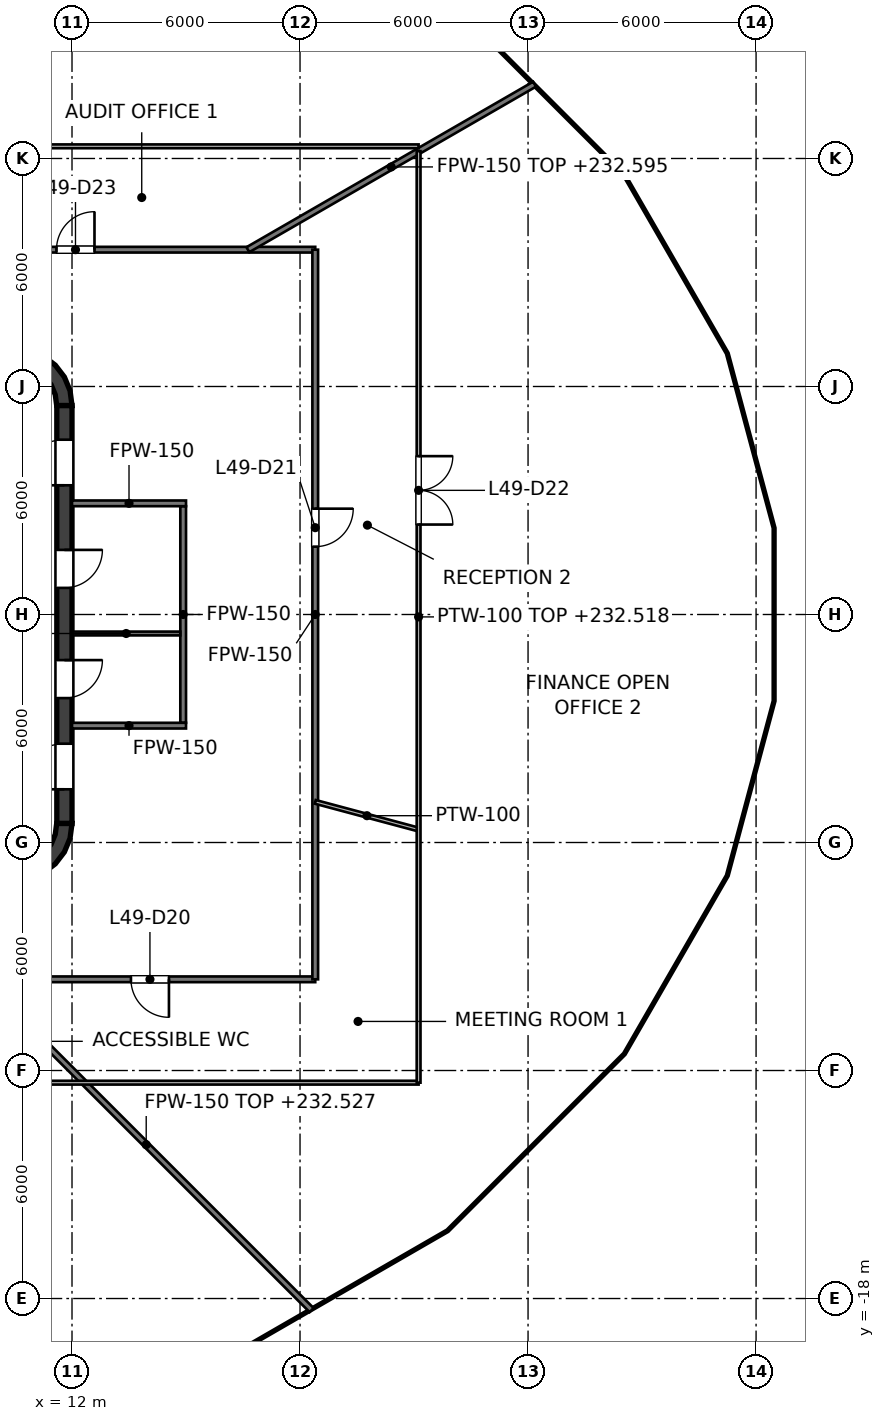
"""IFC4 building model, lengths in metres.
Left out: names, types, materials, properties, quantities, classifications, styles, units other than length and angle.
Written with IfcOpenShell. Run it as: python <this file> out.ifc"""

import sys

from ifc_helpers import new_model, si_unit, direction, frame, frame_2d, origin, place, context, subcontext, project, spatial, polyline, rectangle, outline, extrude, element, fill, save


model = new_model("IFC4")
c1 = context("Model", 3, precision=1e-05, world=origin(), true_north=direction((0.0, 1.0)))
c2 = subcontext(c1, "Body", "Model", "MODEL_VIEW")
j1 = project(units=[si_unit("LENGTHUNIT", "METRE"), si_unit("PLANEANGLEUNIT", "RADIAN")], contexts=[c1])
p1 = place(None, origin())
s1 = spatial("IfcSite", under=j1, at=p1, CompositionType="ELEMENT")
p2 = place(p1, origin())
s2 = spatial("IfcBuilding", under=s1, at=p2, CompositionType="ELEMENT")
p3 = place(p2, frame((0.0, 0.0, 229.6)))
s3 = spatial("IfcBuildingStorey", under=s2, at=p3, CompositionType="ELEMENT", Elevation=229.6)
p4 = place(p3, frame((11.8, -5.5, 0.0), z_axis=(0.0, 0.0, 1.0), x_axis=(0.0, 1.0, 0.0)))
e1 = element("IfcWall", 1, at=p4, inside=s3, PredefinedType="SHEAR", context=c2, shape_type="SweptSolid", body=[
    extrude(rectangle(XDim=11.0, YDim=0.4, at=frame_2d((5.5, 0.0))), origin(), (0.0, 0.0, 1.0), 4.0),
])
p5 = place(p4, frame((3.3, 0.0, 0.0)))
e2 = element("IfcOpeningElement", 2, at=p5, cuts=e1, PredefinedType="OPENING", context=c2, shape_type="SweptSolid", body=[
    extrude(rectangle(XDim=1.0, YDim=2.1, at=frame_2d((0.5, 1.05))), frame((0.0, 0.2, 0.0), z_axis=(0.0, -1.0, 0.0), x_axis=(1.0, 0.0, 0.0)), (0.0, 0.0, 1.0), 0.4),
])
p6 = place(p4, frame((6.2, 0.0, 0.0)))
e3 = element("IfcOpeningElement", 3, at=p6, cuts=e1, PredefinedType="OPENING", context=c2, shape_type="SweptSolid", body=[
    extrude(rectangle(XDim=1.0, YDim=2.1, at=frame_2d((0.5, 1.05))), frame((0.0, 0.2, 0.0), z_axis=(0.0, -1.0, 0.0), x_axis=(1.0, 0.0, 0.0)), (0.0, 0.0, 1.0), 0.4),
])
p7 = place(p4, frame((0.9, 0.0, 0.0)))
e4 = element("IfcOpeningElement", 4, at=p7, cuts=e1, PredefinedType="OPENING", context=c2, shape_type="SweptSolid", body=[
    extrude(rectangle(XDim=1.2, YDim=2.1, at=frame_2d((0.6, 1.05))), frame((0.0, 0.2, 0.0), z_axis=(0.0, -1.0, 0.0), x_axis=(1.0, 0.0, 0.0)), (0.0, 0.0, 1.0), 0.4),
])
p8 = place(p4, frame((8.9, 0.0, 0.0)))
e5 = element("IfcOpeningElement", 5, at=p8, cuts=e1, PredefinedType="OPENING", context=c2, shape_type="SweptSolid", body=[
    extrude(rectangle(XDim=1.2, YDim=2.1, at=frame_2d((0.6, 1.05))), frame((0.0, 0.2, 0.0), z_axis=(0.0, -1.0, 0.0), x_axis=(1.0, 0.0, 0.0)), (0.0, 0.0, 1.0), 0.4),
])
p9 = place(p3, origin())
e6 = element("IfcWall", 6, at=p9, inside=s3, PredefinedType="SHEAR", context=c2, shape_type="SweptSolid", body=[
    extrude(outline(polyline([(10.5, 7.0), (10.5, 6.596), (10.784, 6.559), (11.048, 6.45), (11.275, 6.275), (11.45, 6.048), (11.559, 5.784), (11.596, 5.5), (12.0, 5.5), (11.949, 5.888), (11.799, 6.25), (11.561, 6.561), (11.25, 6.799), (10.888, 6.949), (10.5, 7.0)])), origin(), (0.0, 0.0, 1.0), 4.0),
])
e7 = element("IfcWall", 7, at=p9, inside=s3, PredefinedType="SHEAR", context=c2, shape_type="SweptSolid", body=[
    extrude(outline(polyline([(12.0, -5.5), (11.596, -5.5), (11.559, -5.784), (11.45, -6.048), (11.275, -6.275), (11.048, -6.45), (10.784, -6.559), (10.5, -6.596), (10.5, -7.0), (10.888, -6.949), (11.25, -6.799), (11.561, -6.561), (11.799, -6.25), (11.949, -5.888), (12.0, -5.5)])), origin(), (0.0, 0.0, 1.0), 4.0),
])
p10 = place(p3, frame((14.925, -2.85, 0.0), z_axis=(0.0, 0.0, 1.0), x_axis=(0.0, 1.0, 0.0)))
e8 = element("IfcWall", 8, at=p10, inside=s3, PredefinedType="PARTITIONING", context=c2, shape_type="SweptSolid", body=[
    extrude(rectangle(XDim=5.7, YDim=0.15, at=frame_2d((2.85, 0.0))), origin(), (0.0, 0.0, 1.0), 2.918),
])
for number, where, z_axis, x_axis in (
    (9, (12.0, 2.925, 0.0), (0.0, 0.0, 1.0), (1.0, 0.0, 0.0)),
    (10, (12.0, -2.925, 0.0), (0.0, 0.0, 1.0), (1.0, 0.0, 0.0)),
):
    element("IfcWall", number, at=place(p3, frame(where, z_axis=z_axis, x_axis=x_axis)), inside=s3, PredefinedType="PARTITIONING", context=c2, shape_type="SweptSolid", body=[
        extrude(rectangle(XDim=3.0, YDim=0.15, at=frame_2d((1.5, 0.0))), origin(), (0.0, 0.0, 1.0), 2.918),
    ])
p11 = place(p3, frame((12.0, -0.5, 0.0), z_axis=(0.0, 0.0, 1.0), x_axis=(1.0, 0.0, 0.0)))
e11 = element("IfcWall", 11, at=p11, inside=s3, PredefinedType="PARTITIONING", context=c2, shape_type="SweptSolid", body=[
    extrude(rectangle(XDim=2.85, YDim=0.1, at=frame_2d((1.425, 0.0))), origin(), (0.0, 0.0, 1.0), 3.85),
])
p12 = place(p3, frame((9.6, -9.6, 0.0), z_axis=(0.0, 0.0, 1.0), x_axis=(0.707106781187, -0.707106781187, 0.0)))
e12 = element("IfcWall", 12, at=p12, inside=s3, PredefinedType="PARTITIONING", context=c2, shape_type="SweptSolid", body=[
    extrude(rectangle(XDim=12.311, YDim=0.15, at=frame_2d((6.155, 0.0))), origin(), (0.0, 0.0, 1.0), 2.927),
])
p13 = place(p3, frame((-18.4, -9.6, 0.0), z_axis=(0.0, 0.0, 1.0), x_axis=(1.0, 0.0, 0.0)))
e13 = element("IfcWall", 13, at=p13, inside=s3, PredefinedType="PARTITIONING", context=c2, shape_type="SweptSolid", body=[
    extrude(rectangle(XDim=36.8, YDim=0.15, at=frame_2d((18.4, 0.0))), origin(), (0.0, 0.0, 1.0), 2.927),
])
p14 = place(p13, frame((13.866, 0.0, 0.0)))
e14 = element("IfcOpeningElement", 14, at=p14, cuts=e13, PredefinedType="OPENING", context=c2, shape_type="SweptSolid", body=[
    extrude(rectangle(XDim=1.0, YDim=2.1, at=frame_2d((0.5, 1.05))), frame((0.0, 0.075, 0.0), z_axis=(0.0, -1.0, 0.0), x_axis=(1.0, 0.0, 0.0)), (0.0, 0.0, 1.0), 0.15),
])
p15 = place(p13, frame((18.999, 0.0, 0.0)))
e15 = element("IfcOpeningElement", 15, at=p15, cuts=e13, PredefinedType="OPENING", context=c2, shape_type="SweptSolid", body=[
    extrude(rectangle(XDim=1.0, YDim=2.1, at=frame_2d((0.5, 1.05))), frame((0.0, 0.075, 0.0), z_axis=(0.0, -1.0, 0.0), x_axis=(1.0, 0.0, 0.0)), (0.0, 0.0, 1.0), 0.15),
])
p16 = place(p13, frame((25.061, 0.0, 0.0)))
e16 = element("IfcOpeningElement", 16, at=p16, cuts=e13, PredefinedType="OPENING", context=c2, shape_type="SweptSolid", body=[
    extrude(rectangle(XDim=1.0, YDim=2.1, at=frame_2d((0.5, 1.05))), frame((0.0, 0.075, 0.0), z_axis=(0.0, -1.0, 0.0), x_axis=(1.0, 0.0, 0.0)), (0.0, 0.0, 1.0), 0.15),
])
p17 = place(p13, frame((31.951, 0.0, 0.0)))
e17 = element("IfcOpeningElement", 17, at=p17, cuts=e13, PredefinedType="OPENING", context=c2, shape_type="SweptSolid", body=[
    extrude(rectangle(XDim=1.0, YDim=2.1, at=frame_2d((0.5, 1.05))), frame((0.0, 0.075, 0.0), z_axis=(0.0, -1.0, 0.0), x_axis=(1.0, 0.0, 0.0)), (0.0, 0.0, 1.0), 0.15),
])
p18 = place(p13, frame((1.71, 0.0, 0.0)))
e18 = element("IfcOpeningElement", 18, at=p18, cuts=e13, PredefinedType="OPENING", context=c2, shape_type="SweptSolid", body=[
    extrude(rectangle(XDim=1.0, YDim=2.1, at=frame_2d((0.5, 1.05))), frame((0.0, 0.075, 0.0), z_axis=(0.0, -1.0, 0.0), x_axis=(1.0, 0.0, 0.0)), (0.0, 0.0, 1.0), 0.15),
])
p19 = place(p13, frame((8.038, 0.0, 0.0)))
e19 = element("IfcOpeningElement", 19, at=p19, cuts=e13, PredefinedType="OPENING", context=c2, shape_type="SweptSolid", body=[
    extrude(rectangle(XDim=1.0, YDim=2.1, at=frame_2d((0.5, 1.05))), frame((0.0, 0.075, 0.0), z_axis=(0.0, -1.0, 0.0), x_axis=(1.0, 0.0, 0.0)), (0.0, 0.0, 1.0), 0.15),
])
p20 = place(p3, frame((-18.4, 9.6, 0.0), z_axis=(0.0, 0.0, 1.0), x_axis=(1.0, 0.0, 0.0)))
e20 = element("IfcWall", 20, at=p20, inside=s3, PredefinedType="PARTITIONING", context=c2, shape_type="SweptSolid", body=[
    extrude(rectangle(XDim=36.8, YDim=0.15, at=frame_2d((18.4, 0.0))), origin(), (0.0, 0.0, 1.0), 2.927),
])
p21 = place(p20, frame((29.991, 0.0, 0.0)))
e21 = element("IfcOpeningElement", 21, at=p21, cuts=e20, PredefinedType="OPENING", context=c2, shape_type="SweptSolid", body=[
    extrude(rectangle(XDim=1.0, YDim=2.1, at=frame_2d((0.5, 1.05))), frame((0.0, 0.075, 0.0), z_axis=(0.0, -1.0, 0.0), x_axis=(1.0, 0.0, 0.0)), (0.0, 0.0, 1.0), 0.15),
])
p22 = place(p20, frame((23.208, 0.0, 0.0)))
e22 = element("IfcOpeningElement", 22, at=p22, cuts=e20, PredefinedType="OPENING", context=c2, shape_type="SweptSolid", body=[
    extrude(rectangle(XDim=1.0, YDim=2.1, at=frame_2d((0.5, 1.05))), frame((0.0, 0.075, 0.0), z_axis=(0.0, -1.0, 0.0), x_axis=(1.0, 0.0, 0.0)), (0.0, 0.0, 1.0), 0.15),
])
p23 = place(p20, frame((18.044, 0.0, 0.0)))
e23 = element("IfcOpeningElement", 23, at=p23, cuts=e20, PredefinedType="OPENING", context=c2, shape_type="SweptSolid", body=[
    extrude(rectangle(XDim=1.0, YDim=2.1, at=frame_2d((0.5, 1.05))), frame((0.0, 0.075, 0.0), z_axis=(0.0, -1.0, 0.0), x_axis=(1.0, 0.0, 0.0)), (0.0, 0.0, 1.0), 0.15),
])
p24 = place(p20, frame((11.814, 0.0, 0.0)))
e24 = element("IfcOpeningElement", 24, at=p24, cuts=e20, PredefinedType="OPENING", context=c2, shape_type="SweptSolid", body=[
    extrude(rectangle(XDim=1.0, YDim=2.1, at=frame_2d((0.5, 1.05))), frame((0.0, 0.075, 0.0), z_axis=(0.0, -1.0, 0.0), x_axis=(1.0, 0.0, 0.0)), (0.0, 0.0, 1.0), 0.15),
])
p25 = place(p3, frame((16.628, 9.6, 0.0), z_axis=(0.0, 0.0, 1.0), x_axis=(0.866023145199, 0.500003911965, 0.0)))
e25 = element("IfcWall", 25, at=p25, inside=s3, PredefinedType="PARTITIONING", context=c2, shape_type="SweptSolid", body=[
    extrude(rectangle(XDim=8.71, YDim=0.15, at=frame_2d((4.355, 0.0))), origin(), (0.0, 0.0, 1.0), 2.995),
])
p26 = place(p3, frame((18.4, -9.6, 0.0), z_axis=(0.0, 0.0, 1.0), x_axis=(0.0, 1.0, 0.0)))
e26 = element("IfcWall", 26, at=p26, inside=s3, PredefinedType="PARTITIONING", context=c2, shape_type="SweptSolid", body=[
    extrude(rectangle(XDim=19.2, YDim=0.15, at=frame_2d((9.6, 0.0))), origin(), (0.0, 0.0, 1.0), 2.918),
])
p27 = place(p26, frame((11.385, 0.0, 0.0)))
e27 = element("IfcOpeningElement", 27, at=p27, cuts=e26, PredefinedType="OPENING", context=c2, shape_type="SweptSolid", body=[
    extrude(rectangle(XDim=1.0, YDim=2.1, at=frame_2d((0.5, 1.05))), frame((0.0, 0.075, 0.0), z_axis=(0.0, -1.0, 0.0), x_axis=(1.0, 0.0, 0.0)), (0.0, 0.0, 1.0), 0.15),
])
p28 = place(p3, frame((18.4, -4.93, 0.0), z_axis=(0.0, 0.0, 1.0), x_axis=(0.965914770141, -0.258860303684, 0.0)))
e28 = element("IfcWall", 28, at=p28, inside=s3, PredefinedType="PARTITIONING", context=c2, shape_type="SweptSolid", body=[
    extrude(rectangle(XDim=2.816, YDim=0.1, at=frame_2d((1.408, 0.0))), origin(), (0.0, 0.0, 1.0), 3.85),
])
p29 = place(p3, frame((-16.615, -12.32, 0.0), z_axis=(0.0, 0.0, 1.0), x_axis=(1.0, 0.0, 0.0)))
e29 = element("IfcWall", 29, at=p29, inside=s3, PredefinedType="PARTITIONING", context=c2, shape_type="SweptSolid", body=[
    extrude(rectangle(XDim=37.735, YDim=0.1, at=frame_2d((18.868, 0.0))), origin(), (0.0, 0.0, 1.0), 2.927),
])
p30 = place(p29, frame((17.19, 0.0, 0.0)))
e30 = element("IfcOpeningElement", 30, at=p30, cuts=e29, PredefinedType="OPENING", context=c2, shape_type="SweptSolid", body=[
    extrude(rectangle(XDim=1.8, YDim=2.1, at=frame_2d((0.9, 1.05))), frame((0.0, 0.05, 0.0), z_axis=(0.0, -1.0, 0.0), x_axis=(1.0, 0.0, 0.0)), (0.0, 0.0, 1.0), 0.1),
])
p31 = place(p29, frame((4.301, 0.0, 0.0)))
e31 = element("IfcOpeningElement", 31, at=p31, cuts=e29, PredefinedType="OPENING", context=c2, shape_type="SweptSolid", body=[
    extrude(rectangle(XDim=0.9, YDim=2.1, at=frame_2d((0.45, 1.05))), frame((0.0, 0.05, 0.0), z_axis=(0.0, -1.0, 0.0), x_axis=(1.0, 0.0, 0.0)), (0.0, 0.0, 1.0), 0.1),
])
p32 = place(p3, frame((-21.12, 12.32, 0.0), z_axis=(0.0, 0.0, 1.0), x_axis=(1.0, 0.0, 0.0)))
e32 = element("IfcWall", 32, at=p32, inside=s3, PredefinedType="PARTITIONING", context=c2, shape_type="SweptSolid", body=[
    extrude(rectangle(XDim=42.24, YDim=0.1, at=frame_2d((21.12, 0.0))), origin(), (0.0, 0.0, 1.0), 2.927),
])
p33 = place(p32, frame((20.419, 0.0, 0.0)))
e33 = element("IfcOpeningElement", 33, at=p33, cuts=e32, PredefinedType="OPENING", context=c2, shape_type="SweptSolid", body=[
    extrude(rectangle(XDim=1.8, YDim=2.1, at=frame_2d((0.9, 1.05))), frame((0.0, 0.05, 0.0), z_axis=(0.0, -1.0, 0.0), x_axis=(1.0, 0.0, 0.0)), (0.0, 0.0, 1.0), 0.1),
])
p34 = place(p3, frame((21.12, -12.32, 0.0), z_axis=(0.0, 0.0, 1.0), x_axis=(0.0, 1.0, 0.0)))
e34 = element("IfcWall", 34, at=p34, inside=s3, PredefinedType="PARTITIONING", context=c2, shape_type="SweptSolid", body=[
    extrude(rectangle(XDim=24.513, YDim=0.1, at=frame_2d((12.257, 0.0))), origin(), (0.0, 0.0, 1.0), 2.918),
])
p35 = place(p34, frame((14.687, 0.0, 0.0)))
e35 = element("IfcOpeningElement", 35, at=p35, cuts=e34, PredefinedType="OPENING", context=c2, shape_type="SweptSolid", body=[
    extrude(rectangle(XDim=1.8, YDim=2.1, at=frame_2d((0.9, 1.05))), frame((0.0, 0.05, 0.0), z_axis=(0.0, -1.0, 0.0), x_axis=(1.0, 0.0, 0.0)), (0.0, 0.0, 1.0), 0.1),
])
p36 = place(p5, origin())
e36 = element("IfcDoor", 36, at=p36, inside=s3, OperationType="SINGLE_SWING_RIGHT", PredefinedType="DOOR", context=c2, shape_type="SweptSolid", body=[
    extrude(rectangle(XDim=1.0, YDim=2.1, at=frame_2d((0.5, 1.05))), frame((0.0, 0.025, 0.0), z_axis=(0.0, -1.0, 0.0), x_axis=(1.0, 0.0, 0.0)), (0.0, 0.0, 1.0), 0.05),
])
fill(e2, e36)
p37 = place(p6, origin())
e37 = element("IfcDoor", 37, at=p37, inside=s3, OperationType="SINGLE_SWING_RIGHT", PredefinedType="DOOR", context=c2, shape_type="SweptSolid", body=[
    extrude(rectangle(XDim=1.0, YDim=2.1, at=frame_2d((0.5, 1.05))), frame((0.0, 0.025, 0.0), z_axis=(0.0, -1.0, 0.0), x_axis=(1.0, 0.0, 0.0)), (0.0, 0.0, 1.0), 0.05),
])
fill(e3, e37)
p38 = place(p7, origin())
e38 = element("IfcDoor", 38, at=p38, inside=s3, OperationType="SINGLE_SWING_LEFT", PredefinedType="DOOR", context=c2, shape_type="SweptSolid", body=[
    extrude(rectangle(XDim=1.2, YDim=2.1, at=frame_2d((0.6, 1.05))), frame((0.0, 0.025, 0.0), z_axis=(0.0, -1.0, 0.0), x_axis=(1.0, 0.0, 0.0)), (0.0, 0.0, 1.0), 0.05),
])
fill(e4, e38)
p39 = place(p8, origin())
e39 = element("IfcDoor", 39, at=p39, inside=s3, OperationType="SINGLE_SWING_LEFT", PredefinedType="DOOR", context=c2, shape_type="SweptSolid", body=[
    extrude(rectangle(XDim=1.2, YDim=2.1, at=frame_2d((0.6, 1.05))), frame((0.0, 0.025, 0.0), z_axis=(0.0, -1.0, 0.0), x_axis=(1.0, 0.0, 0.0)), (0.0, 0.0, 1.0), 0.05),
])
fill(e5, e39)
p40 = place(p17, origin())
e40 = element("IfcDoor", 40, at=p40, inside=s3, OperationType="SINGLE_SWING_RIGHT", PredefinedType="DOOR", context=c2, shape_type="SweptSolid", body=[
    extrude(rectangle(XDim=1.0, YDim=2.1, at=frame_2d((0.5, 1.05))), frame((0.0, 0.025, 0.0), z_axis=(0.0, -1.0, 0.0), x_axis=(1.0, 0.0, 0.0)), (0.0, 0.0, 1.0), 0.05),
])
fill(e17, e40)
p41 = place(p27, origin())
e41 = element("IfcDoor", 41, at=p41, inside=s3, OperationType="SINGLE_SWING_RIGHT", PredefinedType="DOOR", context=c2, shape_type="SweptSolid", body=[
    extrude(rectangle(XDim=1.0, YDim=2.1, at=frame_2d((0.5, 1.05))), frame((0.0, 0.025, 0.0), z_axis=(0.0, -1.0, 0.0), x_axis=(1.0, 0.0, 0.0)), (0.0, 0.0, 1.0), 0.05),
])
fill(e27, e41)
p42 = place(p35, origin())
e42 = element("IfcDoor", 42, at=p42, inside=s3, OperationType="DOUBLE_DOOR_SINGLE_SWING", PredefinedType="DOOR", context=c2, shape_type="SweptSolid", body=[
    extrude(rectangle(XDim=1.8, YDim=2.1, at=frame_2d((0.9, 1.05))), frame((0.0, 0.025, 0.0), z_axis=(0.0, -1.0, 0.0), x_axis=(1.0, 0.0, 0.0)), (0.0, 0.0, 1.0), 0.05),
])
fill(e35, e42)
p43 = place(p21, origin())
e43 = element("IfcDoor", 43, at=p43, inside=s3, OperationType="SINGLE_SWING_RIGHT", PredefinedType="DOOR", context=c2, shape_type="SweptSolid", body=[
    extrude(rectangle(XDim=1.0, YDim=2.1, at=frame_2d((0.5, 1.05))), frame((0.0, 0.025, 0.0), z_axis=(0.0, -1.0, 0.0), x_axis=(1.0, 0.0, 0.0)), (0.0, 0.0, 1.0), 0.05),
])
fill(e21, e43)
save(model, sys.argv[1])
